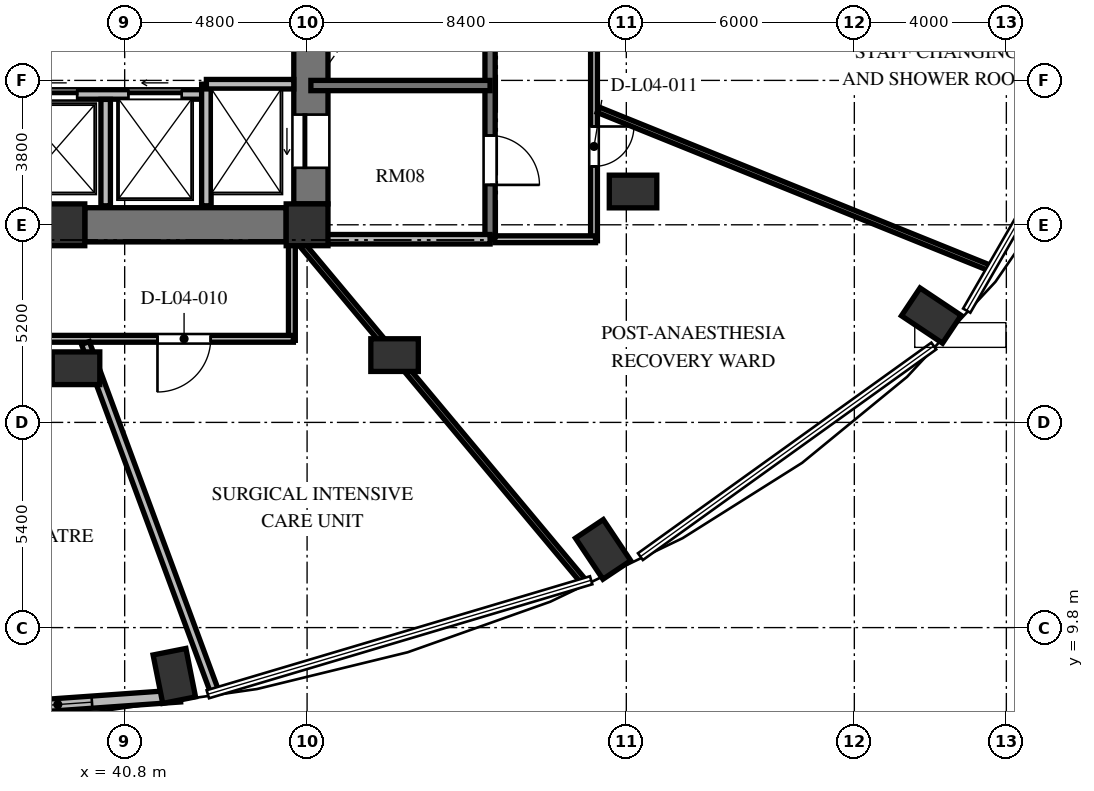
"""IFC4 building model, lengths in metres.
Left out: names, types, materials, properties, quantities, classifications, styles, units other than length and angle.
Written with IfcOpenShell. Run it as: python <this file> out.ifc"""

import sys

from ifc_helpers import new_model, si_unit, direction, frame, frame_2d, origin, origin_2d, place, context, subcontext, project, spatial, rectangle, extrude, element, fill, save


model = new_model("IFC4")
c1 = context("Model", 3, precision=1e-05, world=origin(), true_north=direction((0.0, 1.0)))
c2 = subcontext(c1, "Body", "Model", "MODEL_VIEW")
j1 = project(units=[si_unit("LENGTHUNIT", "METRE"), si_unit("PLANEANGLEUNIT", "RADIAN")], contexts=[c1])
p1 = place(None, origin())
s1 = spatial("IfcSite", under=j1, at=p1, CompositionType="ELEMENT")
p2 = place(p1, origin())
s2 = spatial("IfcBuilding", under=s1, at=p2, CompositionType="ELEMENT")
p3 = place(p2, frame((0.0, 0.0, 20.4)))
s3 = spatial("IfcBuildingStorey", under=s2, at=p3, CompositionType="ELEMENT", Elevation=20.4)
for number, where, z_axis, x_axis in (
    (1, (42.106, 8.529, 0.0), (0.0, 0.0, 1.0), (0.195, -0.981, 0.0)),
    (2, (53.389, 11.858, 0.0), (0.0, 0.0, 1.0), (0.556, -0.831, 0.0)),
    (3, (62.025, 18.011, 0.0), (0.0, 0.0, 1.0), (0.831, -0.556, 0.0)),
):
    element("IfcColumn", number, at=place(p3, frame(where, z_axis=z_axis, x_axis=x_axis)), inside=s3, PredefinedType="COLUMN", context=c2, shape_type="SweptSolid", body=[
        extrude(rectangle(XDim=1.3, YDim=0.88, at=origin_2d()), origin(), (0.0, 0.0, 1.0), 4.8),
    ])
for number, where, z_axis, x_axis in (
    (4, (39.2, 20.4, 0.0), (0.0, 0.0, 1.0), (1.0, 0.0, 0.0)),
    (5, (45.6, 20.4, 0.0), (0.0, 0.0, 1.0), (1.0, 0.0, 0.0)),
):
    element("IfcColumn", number, at=place(p3, frame(where, z_axis=z_axis, x_axis=x_axis)), inside=s3, PredefinedType="COLUMN", context=c2, shape_type="SweptSolid", body=[
        extrude(rectangle(XDim=1.1, YDim=1.1, at=origin_2d()), origin(), (0.0, 0.0, 1.0), 4.8),
    ])
for number, where, z_axis, x_axis in (
    (6, (39.52, 16.625, 0.0), (0.0, 0.0, 1.0), (1.0, 0.0, 0.0)),
    (7, (47.902, 16.971, 0.0), (0.0, 0.0, 1.0), (1.0, 0.0, 0.0)),
    (8, (54.177, 21.276, 0.0), (0.0, 0.0, 1.0), (1.0, 0.0, 0.0)),
):
    element("IfcColumn", number, at=place(p3, frame(where, z_axis=z_axis, x_axis=x_axis)), inside=s3, PredefinedType="COLUMN", context=c2, shape_type="SweptSolid", body=[
        extrude(rectangle(XDim=1.25, YDim=0.86, at=origin_2d()), origin(), (0.0, 0.0, 1.0), 4.8),
    ])
p4 = place(p3, frame((45.7, 20.95, 0.0), z_axis=(0.0, 0.0, 1.0), x_axis=(0.0, 1.0, 0.0)))
e9 = element("IfcWall", 9, at=p4, inside=s3, PredefinedType="SHEAR", context=c2, shape_type="SweptSolid", body=[
    extrude(rectangle(XDim=14.1, YDim=0.9, at=frame_2d((7.05, 0.0))), origin(), (0.0, 0.0, 1.0), 4.8),
])
p5 = place(p4, frame((11.75, 0.0, 0.0)))
e10 = element("IfcOpeningElement", 10, at=p5, cuts=e9, PredefinedType="OPENING", context=c2, shape_type="SweptSolid", body=[
    extrude(rectangle(XDim=1.4, YDim=2.3, at=frame_2d((0.7, 1.15))), frame((0.0, 0.46, 0.0), z_axis=(0.0, -1.0, 0.0), x_axis=(1.0, 0.0, 0.0)), (0.0, 0.0, 1.0), 0.92),
])
p6 = place(p4, frame((0.95, 0.0, 0.0)))
e11 = element("IfcOpeningElement", 11, at=p6, cuts=e9, PredefinedType="OPENING", context=c2, shape_type="SweptSolid", body=[
    extrude(rectangle(XDim=1.4, YDim=2.3, at=frame_2d((0.7, 1.15))), frame((0.0, 0.46, 0.0), z_axis=(0.0, -1.0, 0.0), x_axis=(1.0, 0.0, 0.0)), (0.0, 0.0, 1.0), 0.92),
])
p7 = place(p3, frame((39.75, 20.4, 0.0), z_axis=(0.0, 0.0, 1.0), x_axis=(1.0, 0.0, 0.0)))
e12 = element("IfcWall", 12, at=p7, inside=s3, PredefinedType="SHEAR", context=c2, shape_type="SweptSolid", body=[
    extrude(rectangle(XDim=5.3, YDim=0.9, at=frame_2d((2.65, 0.0))), origin(), (0.0, 0.0, 1.0), 4.8),
])
p8 = place(p3, frame((35.82, 7.547, 0.0), z_axis=(0.0, 0.0, 1.0), x_axis=(0.99751367159, 0.070473221795, 0.0)))
e13 = element("IfcWall", 13, at=p8, inside=s3, PredefinedType="SOLIDWALL", context=c2, shape_type="SweptSolid", body=[
    extrude(rectangle(XDim=6.458, YDim=0.32, at=frame_2d((3.229, 0.0))), origin(), (0.0, 0.0, 1.0), 4.58),
])
p9 = place(p8, frame((2.329, 0.0, 0.85)))
e14 = element("IfcOpeningElement", 14, at=p9, cuts=e13, PredefinedType="OPENING", context=c2, shape_type="SweptSolid", body=[
    extrude(rectangle(XDim=1.8, YDim=2.4, at=frame_2d((0.9, 1.2))), frame((0.0, 0.17, 0.0), z_axis=(0.0, -1.0, 0.0), x_axis=(1.0, 0.0, 0.0)), (0.0, 0.0, 1.0), 0.34),
])
p10 = place(p3, frame((26.75, 23.83, 0.0), z_axis=(0.0, 0.0, 1.0), x_axis=(1.0, 0.0, 0.0)))
e15 = element("IfcWall", 15, at=p10, inside=s3, PredefinedType="SOLIDWALL", context=c2, shape_type="SweptSolid", body=[
    extrude(rectangle(XDim=16.2, YDim=0.25, at=frame_2d((8.1, 0.0))), origin(), (0.0, 0.0, 1.0), 4.58),
])
p11 = place(p10, frame((0.9, 0.0, 0.0)))
e16 = element("IfcOpeningElement", 16, at=p11, cuts=e15, PredefinedType="OPENING", context=c2, shape_type="SweptSolid", body=[
    extrude(rectangle(XDim=1.1, YDim=2.2, at=frame_2d((0.55, 1.1))), frame((0.0, 0.135, 0.0), z_axis=(0.0, -1.0, 0.0), x_axis=(1.0, 0.0, 0.0)), (0.0, 0.0, 1.0), 0.27),
])
p12 = place(p10, frame((3.5, 0.0, 0.0)))
e17 = element("IfcOpeningElement", 17, at=p12, cuts=e15, PredefinedType="OPENING", context=c2, shape_type="SweptSolid", body=[
    extrude(rectangle(XDim=1.1, YDim=2.2, at=frame_2d((0.55, 1.1))), frame((0.0, 0.135, 0.0), z_axis=(0.0, -1.0, 0.0), x_axis=(1.0, 0.0, 0.0)), (0.0, 0.0, 1.0), 0.27),
])
p13 = place(p10, frame((6.3, 0.0, 0.0)))
e18 = element("IfcOpeningElement", 18, at=p13, cuts=e15, PredefinedType="OPENING", context=c2, shape_type="SweptSolid", body=[
    extrude(rectangle(XDim=1.1, YDim=2.2, at=frame_2d((0.55, 1.1))), frame((0.0, 0.135, 0.0), z_axis=(0.0, -1.0, 0.0), x_axis=(1.0, 0.0, 0.0)), (0.0, 0.0, 1.0), 0.27),
])
p14 = place(p10, frame((8.9, 0.0, 0.0)))
e19 = element("IfcOpeningElement", 19, at=p14, cuts=e15, PredefinedType="OPENING", context=c2, shape_type="SweptSolid", body=[
    extrude(rectangle(XDim=1.1, YDim=2.2, at=frame_2d((0.55, 1.1))), frame((0.0, 0.135, 0.0), z_axis=(0.0, -1.0, 0.0), x_axis=(1.0, 0.0, 0.0)), (0.0, 0.0, 1.0), 0.27),
])
p15 = place(p10, frame((11.7, 0.0, 0.0)))
e20 = element("IfcOpeningElement", 20, at=p15, cuts=e15, PredefinedType="OPENING", context=c2, shape_type="SweptSolid", body=[
    extrude(rectangle(XDim=1.1, YDim=2.2, at=frame_2d((0.55, 1.1))), frame((0.0, 0.135, 0.0), z_axis=(0.0, -1.0, 0.0), x_axis=(1.0, 0.0, 0.0)), (0.0, 0.0, 1.0), 0.27),
])
p16 = place(p10, frame((14.15, 0.0, 0.0)))
e21 = element("IfcOpeningElement", 21, at=p16, cuts=e15, PredefinedType="OPENING", context=c2, shape_type="SweptSolid", body=[
    extrude(rectangle(XDim=1.4, YDim=2.3, at=frame_2d((0.7, 1.15))), frame((0.0, 0.135, 0.0), z_axis=(0.0, -1.0, 0.0), x_axis=(1.0, 0.0, 0.0)), (0.0, 0.0, 1.0), 0.27),
])
p17 = place(p3, frame((42.95, 20.9, 0.0), z_axis=(0.0, 0.0, 1.0), x_axis=(0.0, 1.0, 0.0)))
e22 = element("IfcWall", 22, at=p17, inside=s3, PredefinedType="SOLIDWALL", context=c2, shape_type="SweptSolid", body=[
    extrude(rectangle(XDim=3.2, YDim=0.25, at=frame_2d((1.6, 0.0))), origin(), (0.0, 0.0, 1.0), 4.58),
])
p18 = place(p3, frame((42.95, 24.1, 0.0), z_axis=(0.0, 0.0, 1.0), x_axis=(1.0, 0.0, 0.0)))
e23 = element("IfcWall", 23, at=p18, inside=s3, PredefinedType="SOLIDWALL", context=c2, shape_type="SweptSolid", body=[
    extrude(rectangle(XDim=2.3, YDim=0.25, at=frame_2d((1.15, 0.0))), origin(), (0.0, 0.0, 1.0), 4.58),
])
p19 = place(p3, frame((40.3, 20.9, 0.0), z_axis=(0.0, 0.0, 1.0), x_axis=(0.0, 1.0, 0.0)))
e24 = element("IfcWall", 24, at=p19, inside=s3, PredefinedType="SOLIDWALL", context=c2, shape_type="SweptSolid", body=[
    extrude(rectangle(XDim=2.8, YDim=0.25, at=frame_2d((1.4, 0.0))), origin(), (0.0, 0.0, 1.0), 4.58),
])
p20 = place(p3, frame((50.415, 35.845, 0.0), z_axis=(0.0, 0.0, 1.0), x_axis=(0.0, -1.0, 0.0)))
e25 = element("IfcWall", 25, at=p20, inside=s3, PredefinedType="SHEAR", context=c2, shape_type="SweptSolid", body=[
    extrude(rectangle(XDim=15.825, YDim=0.27, at=frame_2d((7.913, 0.0))), origin(), (0.0, 0.0, 1.0), 4.8),
])
p21 = place(p20, frame((4.445, 0.0, 0.0)))
e26 = element("IfcOpeningElement", 26, at=p21, cuts=e25, PredefinedType="OPENING", context=c2, shape_type="SweptSolid", body=[
    extrude(rectangle(XDim=1.2, YDim=2.15, at=frame_2d((0.6, 1.075))), frame((0.0, 0.145, 0.0), z_axis=(0.0, -1.0, 0.0), x_axis=(1.0, 0.0, 0.0)), (0.0, 0.0, 1.0), 0.29),
])
p22 = place(p20, frame((1.295, 0.0, 0.0)))
e27 = element("IfcOpeningElement", 27, at=p22, cuts=e25, PredefinedType="OPENING", context=c2, shape_type="SweptSolid", body=[
    extrude(rectangle(XDim=1.3, YDim=2.2, at=frame_2d((0.65, 1.1))), frame((0.0, 0.145, 0.0), z_axis=(0.0, -1.0, 0.0), x_axis=(1.0, 0.0, 0.0)), (0.0, 0.0, 1.0), 0.29),
])
p23 = place(p20, frame((13.095, 0.0, 0.0)))
e28 = element("IfcOpeningElement", 28, at=p23, cuts=e25, PredefinedType="OPENING", context=c2, shape_type="SweptSolid", body=[
    extrude(rectangle(XDim=1.3, YDim=2.2, at=frame_2d((0.65, 1.1))), frame((0.0, 0.145, 0.0), z_axis=(0.0, -1.0, 0.0), x_axis=(1.0, 0.0, 0.0)), (0.0, 0.0, 1.0), 0.29),
])
p24 = place(p3, frame((45.7, 24.065, 0.0), z_axis=(0.0, 0.0, 1.0), x_axis=(1.0, 0.0, 0.0)))
e29 = element("IfcWall", 29, at=p24, inside=s3, PredefinedType="SHEAR", context=c2, shape_type="SweptSolid", body=[
    extrude(rectangle(XDim=4.715, YDim=0.27, at=frame_2d((2.357, 0.0))), origin(), (0.0, 0.0, 1.0), 4.8),
])
p25 = place(p3, frame((45.7, 20.02, 0.0), z_axis=(0.0, 0.0, 1.0), x_axis=(1.0, 0.0, 0.0)))
e30 = element("IfcWall", 30, at=p25, inside=s3, PredefinedType="SOLIDWALL", context=c2, shape_type="SweptSolid", body=[
    extrude(rectangle(XDim=4.715, YDim=0.25, at=frame_2d((2.357, 0.0))), origin(), (0.0, 0.0, 1.0), 4.58),
])
p26 = place(p3, frame((53.15, 26.64, 0.0), z_axis=(0.0, 0.0, 1.0), x_axis=(0.0, -1.0, 0.0)))
e31 = element("IfcWall", 31, at=p26, inside=s3, PredefinedType="PARTITIONING", context=c2, shape_type="SweptSolid", body=[
    extrude(rectangle(XDim=6.66, YDim=0.18, at=frame_2d((3.33, 0.0))), origin(), (0.0, 0.0, 1.0), 4.58),
])
p27 = place(p26, frame((3.653, 0.0, 0.0)))
e32 = element("IfcOpeningElement", 32, at=p27, cuts=e31, PredefinedType="OPENING", context=c2, shape_type="SweptSolid", body=[
    extrude(rectangle(XDim=1.05, YDim=2.15, at=frame_2d((0.525, 1.075))), frame((0.0, 0.1, 0.0), z_axis=(0.0, -1.0, 0.0), x_axis=(1.0, 0.0, 0.0)), (0.0, 0.0, 1.0), 0.2),
])
p28 = place(p3, frame((53.19, 20.02, 0.0), z_axis=(0.0, 0.0, 1.0), x_axis=(-1.0, 0.0, 0.0)))
e33 = element("IfcWall", 33, at=p28, inside=s3, PredefinedType="PARTITIONING", context=c2, shape_type="SweptSolid", body=[
    extrude(rectangle(XDim=2.65, YDim=0.18, at=frame_2d((1.325, 0.0))), origin(), (0.0, 0.0, 1.0), 4.58),
])
p29 = place(p3, frame((45.2, 19.91, 0.0), z_axis=(0.0, 0.0, 1.0), x_axis=(0.0, -1.0, 0.0)))
e34 = element("IfcWall", 34, at=p29, inside=s3, PredefinedType="PARTITIONING", context=c2, shape_type="SweptSolid", body=[
    extrude(rectangle(XDim=2.55, YDim=0.18, at=frame_2d((1.275, 0.0))), origin(), (0.0, 0.0, 1.0), 4.58),
])
p30 = place(p3, frame((45.24, 17.4, 0.0), z_axis=(0.0, 0.0, 1.0), x_axis=(-1.0, 0.0, 0.0)))
e35 = element("IfcWall", 35, at=p30, inside=s3, PredefinedType="PARTITIONING", context=c2, shape_type="SweptSolid", body=[
    extrude(rectangle(XDim=21.93, YDim=0.18, at=frame_2d((10.965, 0.0))), origin(), (0.0, 0.0, 1.0), 4.58),
])
p31 = place(p30, frame((17.127, 0.0, 0.0)))
e36 = element("IfcOpeningElement", 36, at=p31, cuts=e35, PredefinedType="OPENING", context=c2, shape_type="SweptSolid", body=[
    extrude(rectangle(XDim=1.4, YDim=2.2, at=frame_2d((0.7, 1.1))), frame((0.0, 0.1, 0.0), z_axis=(0.0, -1.0, 0.0), x_axis=(1.0, 0.0, 0.0)), (0.0, 0.0, 1.0), 0.2),
])
p32 = place(p30, frame((9.071, 0.0, 0.0)))
e37 = element("IfcOpeningElement", 37, at=p32, cuts=e35, PredefinedType="OPENING", context=c2, shape_type="SweptSolid", body=[
    extrude(rectangle(XDim=0.95, YDim=2.1, at=frame_2d((0.475, 1.05))), frame((0.0, 0.1, 0.0), z_axis=(0.0, -1.0, 0.0), x_axis=(1.0, 0.0, 0.0)), (0.0, 0.0, 1.0), 0.2),
])
p33 = place(p30, frame((2.177, 0.0, 0.0)))
e38 = element("IfcOpeningElement", 38, at=p33, cuts=e35, PredefinedType="OPENING", context=c2, shape_type="SweptSolid", body=[
    extrude(rectangle(XDim=1.4, YDim=2.2, at=frame_2d((0.7, 1.1))), frame((0.0, 0.1, 0.0), z_axis=(0.0, -1.0, 0.0), x_axis=(1.0, 0.0, 0.0)), (0.0, 0.0, 1.0), 0.2),
])
p34 = place(p3, frame((39.767, 17.29, 0.0), z_axis=(0.0, 0.0, 1.0), x_axis=(0.347365452064, -0.937729834607, 0.0)))
e39 = element("IfcWall", 39, at=p34, inside=s3, PredefinedType="PARTITIONING", context=c2, shape_type="SweptSolid", body=[
    extrude(rectangle(XDim=9.804, YDim=0.22, at=frame_2d((4.902, 0.0))), origin(), (0.0, 0.0, 1.0), 4.58),
])
p35 = place(p3, frame((45.407, 19.95, 0.0), z_axis=(0.0, 0.0, 1.0), x_axis=(0.641117276754, -0.767442921296, 0.0)))
e40 = element("IfcWall", 40, at=p35, inside=s3, PredefinedType="PARTITIONING", context=c2, shape_type="SweptSolid", body=[
    extrude(rectangle(XDim=11.681, YDim=0.15, at=frame_2d((5.84, 0.0))), origin(), (0.0, 0.0, 1.0), 3.165),
])
p36 = place(p3, frame((53.26, 23.426, 0.0), z_axis=(0.0, 0.0, 1.0), x_axis=(0.927183900085, -0.374606480754, 0.0)))
e41 = element("IfcWall", 41, at=p36, inside=s3, PredefinedType="PARTITIONING", context=c2, shape_type="SweptSolid", body=[
    extrude(rectangle(XDim=11.145, YDim=0.15, at=frame_2d((5.572, 0.0))), origin(), (0.0, 0.0, 1.0), 4.58),
])
p37 = place(p9, origin())
e42 = element("IfcWindow", 42, at=p37, inside=s3, PartitioningType="SINGLE_PANEL", PredefinedType="WINDOW", context=c2, shape_type="SweptSolid", body=[
    extrude(rectangle(XDim=1.8, YDim=2.4, at=frame_2d((0.9, 1.2))), frame((0.0, 0.03, 0.0), z_axis=(0.0, -1.0, 0.0), x_axis=(1.0, 0.0, 0.0)), (0.0, 0.0, 1.0), 0.06),
])
fill(e14, e42)
p38 = place(p15, origin())
e43 = element("IfcDoor", 43, at=p38, inside=s3, OperationType="SLIDING_TO_LEFT", PredefinedType="DOOR", context=c2, shape_type="SweptSolid", body=[
    extrude(rectangle(XDim=1.1, YDim=2.2, at=frame_2d((0.55, 1.1))), frame((0.0, 0.025, 0.0), z_axis=(0.0, -1.0, 0.0), x_axis=(1.0, 0.0, 0.0)), (0.0, 0.0, 1.0), 0.05),
])
fill(e20, e43)
p39 = place(p6, origin())
e44 = element("IfcDoor", 44, at=p39, inside=s3, OperationType="SLIDING_TO_LEFT", PredefinedType="DOOR", context=c2, shape_type="SweptSolid", body=[
    extrude(rectangle(XDim=1.4, YDim=2.3, at=frame_2d((0.7, 1.15))), frame((0.0, 0.025, 0.0), z_axis=(0.0, -1.0, 0.0), x_axis=(1.0, 0.0, 0.0)), (0.0, 0.0, 1.0), 0.05),
])
fill(e11, e44)
p40 = place(p16, origin())
e45 = element("IfcDoor", 45, at=p40, inside=s3, OperationType="SLIDING_TO_LEFT", PredefinedType="DOOR", context=c2, shape_type="SweptSolid", body=[
    extrude(rectangle(XDim=1.4, YDim=2.3, at=frame_2d((0.7, 1.15))), frame((0.0, 0.025, 0.0), z_axis=(0.0, -1.0, 0.0), x_axis=(1.0, 0.0, 0.0)), (0.0, 0.0, 1.0), 0.05),
])
fill(e21, e45)
p41 = place(p23, origin())
e46 = element("IfcDoor", 46, at=p41, inside=s3, OperationType="SINGLE_SWING_RIGHT", PredefinedType="DOOR", context=c2, shape_type="SweptSolid", body=[
    extrude(rectangle(XDim=1.3, YDim=2.2, at=frame_2d((0.65, 1.1))), frame((0.0, 0.025, 0.0), z_axis=(0.0, -1.0, 0.0), x_axis=(1.0, 0.0, 0.0)), (0.0, 0.0, 1.0), 0.05),
])
fill(e28, e46)
p42 = place(p33, origin())
e47 = element("IfcDoor", 47, at=p42, inside=s3, OperationType="SINGLE_SWING_RIGHT", PredefinedType="DOOR", context=c2, shape_type="SweptSolid", body=[
    extrude(rectangle(XDim=1.4, YDim=2.2, at=frame_2d((0.7, 1.1))), frame((0.0, 0.025, 0.0), z_axis=(0.0, -1.0, 0.0), x_axis=(1.0, 0.0, 0.0)), (0.0, 0.0, 1.0), 0.05),
])
fill(e38, e47)
p43 = place(p27, origin())
e48 = element("IfcDoor", 48, at=p43, inside=s3, OperationType="SINGLE_SWING_LEFT", PredefinedType="DOOR", context=c2, shape_type="SweptSolid", body=[
    extrude(rectangle(XDim=1.05, YDim=2.15, at=frame_2d((0.525, 1.075))), frame((0.0, 0.025, 0.0), z_axis=(0.0, -1.0, 0.0), x_axis=(1.0, 0.0, 0.0)), (0.0, 0.0, 1.0), 0.05),
])
fill(e32, e48)
save(model, sys.argv[1])
